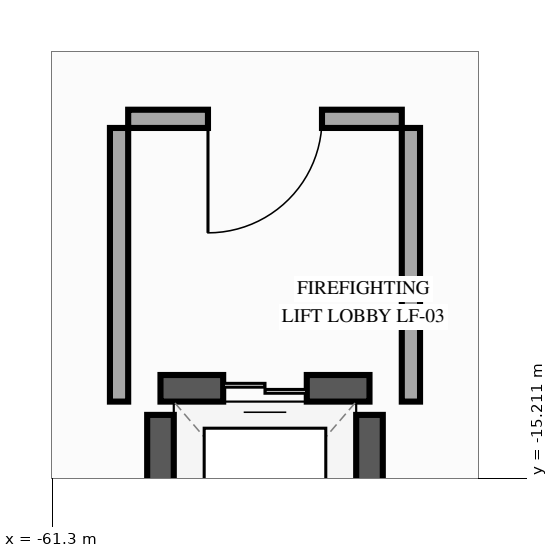
"""IFC4 building model, lengths in metres.
Left out: names, types, materials, properties, quantities, classifications, styles, units other than length and angle.
Written with IfcOpenShell. Run it as: python <this file> out.ifc"""

import sys

from ifc_helpers import new_model, si_unit, direction, frame, frame_2d, origin, place, context, subcontext, project, spatial, rectangle, extrude, element, fill, save


model = new_model("IFC4")
c1 = context("Model", 3, precision=1e-05, world=origin(), true_north=direction((0.0, 1.0)))
c2 = subcontext(c1, "Body", "Model", "MODEL_VIEW")
j1 = project(units=[si_unit("LENGTHUNIT", "METRE"), si_unit("PLANEANGLEUNIT", "RADIAN")], contexts=[c1])
p1 = place(None, origin())
s1 = spatial("IfcSite", under=j1, at=p1, CompositionType="ELEMENT")
p2 = place(p1, origin())
s2 = spatial("IfcBuilding", under=s1, at=p2, CompositionType="ELEMENT")
p3 = place(p2, origin())
s3 = spatial("IfcBuildingStorey", under=s2, at=p3, CompositionType="ELEMENT", Elevation=0.0)
p4 = place(p3, frame((-57.125, -14.025, 0.0), z_axis=(0.0, 0.0, 1.0), x_axis=(-1.0, 0.0, 0.0)))
e1 = element("IfcWall", 1, at=p4, inside=s3, PredefinedType="SHEAR", context=c2, shape_type="SweptSolid", body=[
    extrude(rectangle(XDim=2.75, YDim=0.35, at=frame_2d((1.375, 0.0))), origin(), (0.0, 0.0, 1.0), 5.12),
])
p5 = place(p4, frame((0.825, 0.0, 0.0)))
e2 = element("IfcOpeningElement", 2, at=p5, cuts=e1, PredefinedType="OPENING", context=c2, shape_type="SweptSolid", body=[
    extrude(rectangle(XDim=1.1, YDim=2.2, at=frame_2d((0.55, 1.1))), frame((0.0, 0.185, 0.0), z_axis=(0.0, -1.0, 0.0), x_axis=(1.0, 0.0, 0.0)), (0.0, 0.0, 1.0), 0.37),
])
for number, where, z_axis, x_axis in (
    (3, (-59.875, -16.825, 0.0), (0.0, 0.0, 1.0), (0.0, 1.0, 0.0)),
    (4, (-57.125, -16.825, 0.0), (0.0, 0.0, 1.0), (0.0, 1.0, 0.0)),
):
    element("IfcWall", number, at=place(p3, frame(where, z_axis=z_axis, x_axis=x_axis)), inside=s3, PredefinedType="SHEAR", context=c2, shape_type="SweptSolid", body=[
        extrude(rectangle(XDim=2.45, YDim=0.35, at=frame_2d((1.225, 0.0))), origin(), (0.0, 0.0, 1.0), 5.12),
    ])
p6 = place(p3, frame((-56.7, -10.48, 0.0), z_axis=(0.0, 0.0, 1.0), x_axis=(-1.0, 0.0, 0.0)))
e5 = element("IfcWall", 5, at=p6, inside=s3, PredefinedType="PARTITIONING", context=c2, shape_type="SweptSolid", body=[
    extrude(rectangle(XDim=3.6, YDim=0.24, at=frame_2d((1.8, 0.0))), origin(), (0.0, 0.0, 1.0), 5.07),
])
p7 = place(p6, frame((1.05, 0.0, 0.0)))
e6 = element("IfcOpeningElement", 6, at=p7, cuts=e5, PredefinedType="OPENING", context=c2, shape_type="SweptSolid", body=[
    extrude(rectangle(XDim=1.5, YDim=2.2, at=frame_2d((0.75, 1.1))), frame((0.0, 0.13, 0.0), z_axis=(0.0, -1.0, 0.0), x_axis=(1.0, 0.0, 0.0)), (0.0, 0.0, 1.0), 0.26),
])
for number, where, z_axis, x_axis in (
    (7, (-60.42, -14.2, 0.0), (0.0, 0.0, 1.0), (0.0, 1.0, 0.0)),
    (8, (-56.58, -14.2, 0.0), (0.0, 0.0, 1.0), (0.0, 1.0, 0.0)),
):
    element("IfcWall", number, at=place(p3, frame(where, z_axis=z_axis, x_axis=x_axis)), inside=s3, PredefinedType="PARTITIONING", context=c2, shape_type="SweptSolid", body=[
        extrude(rectangle(XDim=3.6, YDim=0.24, at=frame_2d((1.8, 0.0))), origin(), (0.0, 0.0, 1.0), 4.605),
    ])
p8 = place(p5, origin())
e9 = element("IfcDoor", 9, at=p8, inside=s3, OperationType="DOUBLE_DOOR_SLIDING", PredefinedType="DOOR", context=c2, shape_type="SweptSolid", body=[
    extrude(rectangle(XDim=1.1, YDim=2.2, at=frame_2d((0.55, 1.1))), frame((0.0, 0.025, 0.0), z_axis=(0.0, -1.0, 0.0), x_axis=(1.0, 0.0, 0.0)), (0.0, 0.0, 1.0), 0.05),
])
fill(e2, e9)
p9 = place(p7, origin())
e10 = element("IfcDoor", 10, at=p9, inside=s3, OperationType="SINGLE_SWING_RIGHT", PredefinedType="DOOR", context=c2, shape_type="SweptSolid", body=[
    extrude(rectangle(XDim=1.5, YDim=2.2, at=frame_2d((0.75, 1.1))), frame((0.0, 0.025, 0.0), z_axis=(0.0, -1.0, 0.0), x_axis=(1.0, 0.0, 0.0)), (0.0, 0.0, 1.0), 0.05),
])
fill(e6, e10)
save(model, sys.argv[1])
